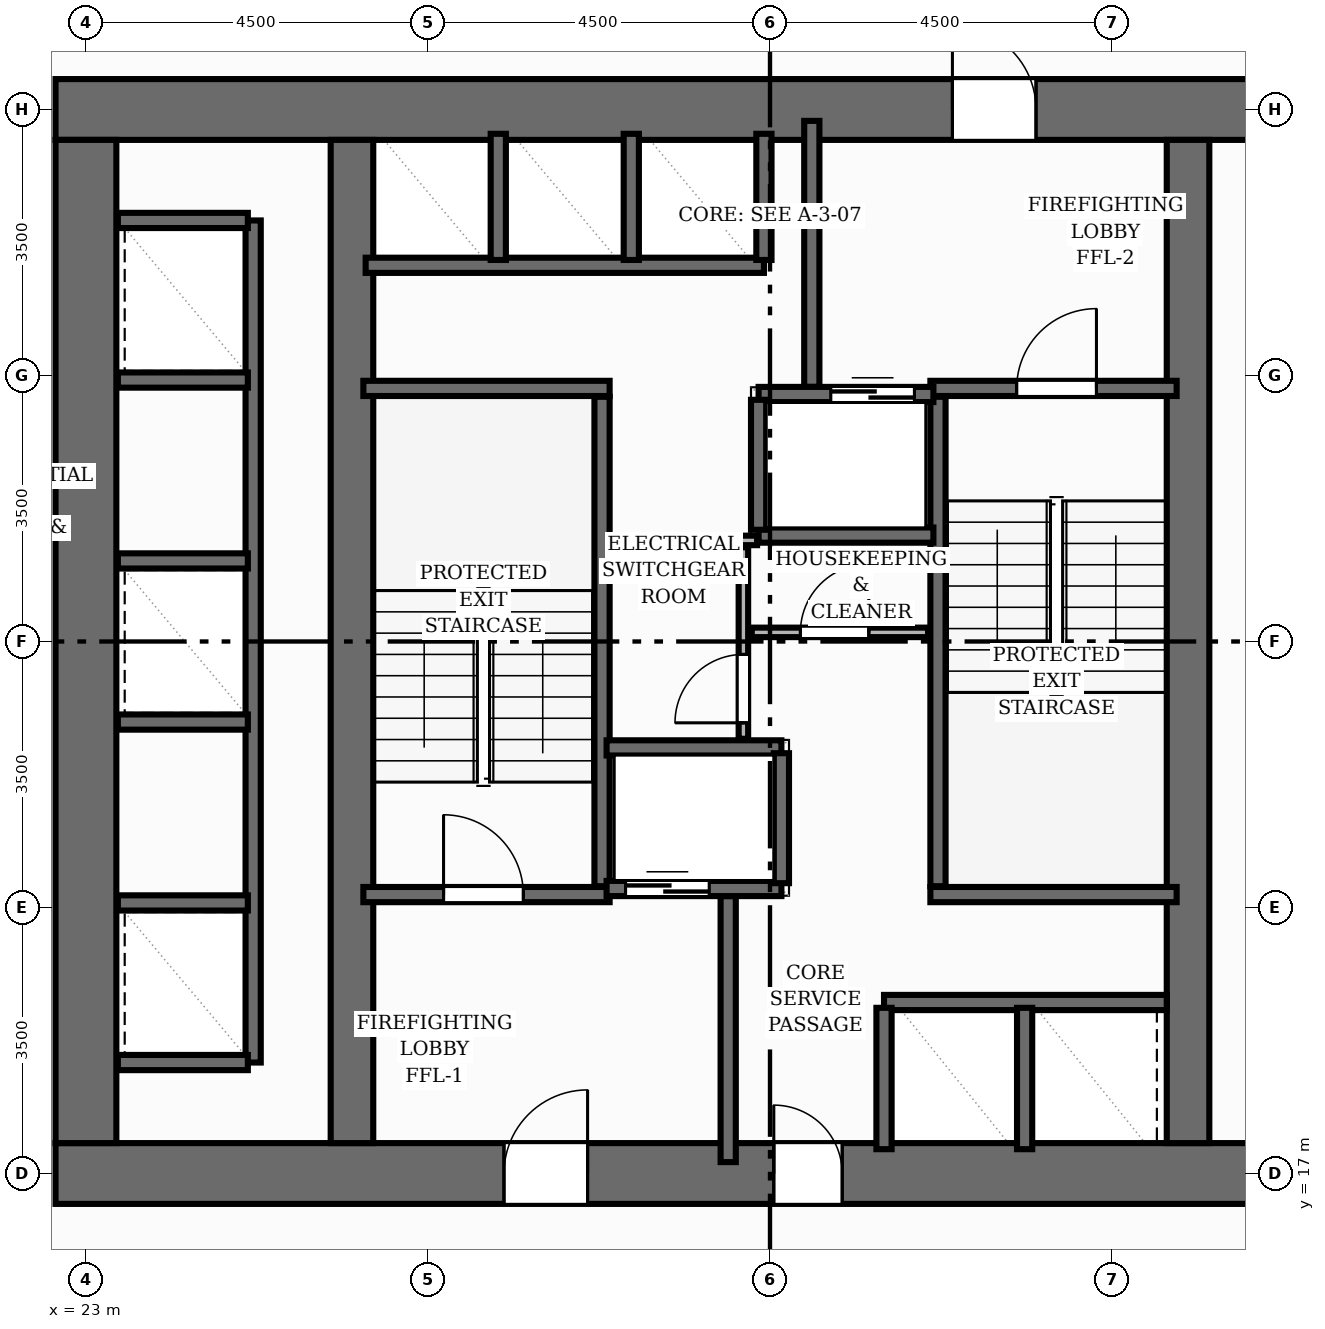
"""IFC4 building model, lengths in metres.
Left out: names, types, materials, properties, quantities, classifications, styles, units other than length and angle.
Written with IfcOpenShell. Run it as: python <this file> out.ifc"""

import sys

from ifc_helpers import new_model, si_unit, direction, frame, frame_2d, origin, place, context, subcontext, project, spatial, rectangle, extrude, element, fill, save


model = new_model("IFC4")
c1 = context("Model", 3, precision=1e-05, world=origin(), true_north=direction((0.0, 1.0)))
c2 = subcontext(c1, "Body", "Model", "MODEL_VIEW")
j1 = project(units=[si_unit("LENGTHUNIT", "METRE"), si_unit("PLANEANGLEUNIT", "RADIAN")], contexts=[c1])
p1 = place(None, origin())
s1 = spatial("IfcSite", under=j1, at=p1, CompositionType="ELEMENT")
p2 = place(p1, origin())
s2 = spatial("IfcBuilding", under=s1, at=p2, CompositionType="ELEMENT")
p3 = place(p2, frame((0.0, 0.0, 28.0)))
s3 = spatial("IfcBuildingStorey", under=s2, at=p3, CompositionType="ELEMENT", Elevation=28.0)
p4 = place(p3, frame((22.6, 17.0, 0.0), z_axis=(0.0, 0.0, 1.0), x_axis=(1.0, 0.0, 0.0)))
e1 = element("IfcWall", 1, at=p4, inside=s3, PredefinedType="SHEAR", context=c2, shape_type="SweptSolid", body=[
    extrude(rectangle(XDim=18.8, YDim=0.8, at=frame_2d((9.4, 0.0))), origin(), (0.0, 0.0, 1.0), 3.2),
])
p5 = place(p4, frame((5.9, 0.0, 0.0)))
e2 = element("IfcOpeningElement", 2, at=p5, cuts=e1, PredefinedType="OPENING", context=c2, shape_type="SweptSolid", body=[
    extrude(rectangle(XDim=1.1, YDim=2.15, at=frame_2d((0.55, 1.075))), frame((0.0, 0.41, 0.0), z_axis=(0.0, -1.0, 0.0), x_axis=(1.0, 0.0, 0.0)), (0.0, 0.0, 1.0), 0.82),
])
p6 = place(p4, frame((9.45, 0.0, 0.0)))
e3 = element("IfcOpeningElement", 3, at=p6, cuts=e1, PredefinedType="OPENING", context=c2, shape_type="SweptSolid", body=[
    extrude(rectangle(XDim=0.9, YDim=2.1, at=frame_2d((0.45, 1.05))), frame((0.0, 0.41, 0.0), z_axis=(0.0, -1.0, 0.0), x_axis=(1.0, 0.0, 0.0)), (0.0, 0.0, 1.0), 0.82),
])
p7 = place(p3, frame((22.6, 31.0, 0.0), z_axis=(0.0, 0.0, 1.0), x_axis=(1.0, 0.0, 0.0)))
e4 = element("IfcWall", 4, at=p7, inside=s3, PredefinedType="SHEAR", context=c2, shape_type="SweptSolid", body=[
    extrude(rectangle(XDim=18.8, YDim=0.8, at=frame_2d((9.4, 0.0))), origin(), (0.0, 0.0, 1.0), 3.2),
])
p8 = place(p7, frame((11.8, 0.0, 0.0)))
e5 = element("IfcOpeningElement", 5, at=p8, cuts=e4, PredefinedType="OPENING", context=c2, shape_type="SweptSolid", body=[
    extrude(rectangle(XDim=1.1, YDim=2.15, at=frame_2d((0.55, 1.075))), frame((0.0, 0.41, 0.0), z_axis=(0.0, -1.0, 0.0), x_axis=(1.0, 0.0, 0.0)), (0.0, 0.0, 1.0), 0.82),
])
p9 = place(p3, frame((23.0, 17.4, 0.0), z_axis=(0.0, 0.0, 1.0), x_axis=(0.0, 1.0, 0.0)))
e6 = element("IfcWall", 6, at=p9, inside=s3, PredefinedType="SHEAR", context=c2, shape_type="SweptSolid", body=[
    extrude(rectangle(XDim=13.2, YDim=0.8, at=frame_2d((6.6, 0.0))), origin(), (0.0, 0.0, 1.0), 3.2),
])
for number, where, z_axis, x_axis in (
    (7, (26.5, 17.4, 0.0), (0.0, 0.0, 1.0), (0.0, 1.0, 0.0)),
    (8, (37.5, 17.4, 0.0), (0.0, 0.0, 1.0), (0.0, 1.0, 0.0)),
):
    element("IfcWall", number, at=place(p3, frame(where, z_axis=z_axis, x_axis=x_axis)), inside=s3, PredefinedType="SHEAR", context=c2, shape_type="SweptSolid", body=[
        extrude(rectangle(XDim=13.2, YDim=0.56, at=frame_2d((6.6, 0.0))), origin(), (0.0, 0.0, 1.0), 3.2),
    ])
p10 = place(p3, frame((29.79, 20.78, 0.0), z_axis=(0.0, 0.0, 1.0), x_axis=(0.0, 1.0, 0.0)))
e9 = element("IfcWall", 9, at=p10, inside=s3, PredefinedType="SHEAR", context=c2, shape_type="SweptSolid", body=[
    extrude(rectangle(XDim=6.44, YDim=0.2, at=frame_2d((3.22, 0.0))), origin(), (0.0, 0.0, 1.0), 3.2),
])
p11 = place(p3, frame((26.65, 27.33, 0.0), z_axis=(0.0, 0.0, 1.0), x_axis=(1.0, 0.0, 0.0)))
e10 = element("IfcWall", 10, at=p11, inside=s3, PredefinedType="SHEAR", context=c2, shape_type="SweptSolid", body=[
    extrude(rectangle(XDim=3.24, YDim=0.2, at=frame_2d((1.62, 0.0))), origin(), (0.0, 0.0, 1.0), 3.2),
])
p12 = place(p3, frame((26.65, 20.67, 0.0), z_axis=(0.0, 0.0, 1.0), x_axis=(1.0, 0.0, 0.0)))
e11 = element("IfcWall", 11, at=p12, inside=s3, PredefinedType="SHEAR", context=c2, shape_type="SweptSolid", body=[
    extrude(rectangle(XDim=3.24, YDim=0.2, at=frame_2d((1.62, 0.0))), origin(), (0.0, 0.0, 1.0), 3.2),
])
p13 = place(p12, frame((1.055, 0.0, 0.0)))
e12 = element("IfcOpeningElement", 12, at=p13, cuts=e11, PredefinedType="OPENING", context=c2, shape_type="SweptSolid", body=[
    extrude(rectangle(XDim=1.05, YDim=2.15, at=frame_2d((0.525, 1.075))), frame((0.0, 0.11, 0.0), z_axis=(0.0, -1.0, 0.0), x_axis=(1.0, 0.0, 0.0)), (0.0, 0.0, 1.0), 0.22),
])
p14 = place(p3, frame((34.21, 20.78, 0.0), z_axis=(0.0, 0.0, 1.0), x_axis=(0.0, 1.0, 0.0)))
e13 = element("IfcWall", 13, at=p14, inside=s3, PredefinedType="SHEAR", context=c2, shape_type="SweptSolid", body=[
    extrude(rectangle(XDim=6.44, YDim=0.2, at=frame_2d((3.22, 0.0))), origin(), (0.0, 0.0, 1.0), 3.2),
])
p15 = place(p3, frame((34.11, 20.67, 0.0), z_axis=(0.0, 0.0, 1.0), x_axis=(1.0, 0.0, 0.0)))
e14 = element("IfcWall", 14, at=p15, inside=s3, PredefinedType="SHEAR", context=c2, shape_type="SweptSolid", body=[
    extrude(rectangle(XDim=3.24, YDim=0.2, at=frame_2d((1.62, 0.0))), origin(), (0.0, 0.0, 1.0), 3.2),
])
p16 = place(p3, frame((34.11, 27.33, 0.0), z_axis=(0.0, 0.0, 1.0), x_axis=(1.0, 0.0, 0.0)))
e15 = element("IfcWall", 15, at=p16, inside=s3, PredefinedType="SHEAR", context=c2, shape_type="SweptSolid", body=[
    extrude(rectangle(XDim=3.24, YDim=0.2, at=frame_2d((1.62, 0.0))), origin(), (0.0, 0.0, 1.0), 3.2),
])
p17 = place(p16, frame((1.135, 0.0, 0.0)))
e16 = element("IfcOpeningElement", 16, at=p17, cuts=e15, PredefinedType="OPENING", context=c2, shape_type="SweptSolid", body=[
    extrude(rectangle(XDim=1.05, YDim=2.15, at=frame_2d((0.525, 1.075))), frame((0.0, 0.11, 0.0), z_axis=(0.0, -1.0, 0.0), x_axis=(1.0, 0.0, 0.0)), (0.0, 0.0, 1.0), 0.22),
])
for number, where, z_axis, x_axis in (
    (17, (31.45, 17.15, 0.0), (0.0, 0.0, 1.0), (0.0, 1.0, 0.0)),
    (18, (32.55, 27.35, 0.0), (0.0, 0.0, 1.0), (0.0, 1.0, 0.0)),
):
    element("IfcWall", number, at=place(p3, frame(where, z_axis=z_axis, x_axis=x_axis)), inside=s3, PredefinedType="SHEAR", context=c2, shape_type="SweptSolid", body=[
        extrude(rectangle(XDim=3.5, YDim=0.2, at=frame_2d((1.75, 0.0))), origin(), (0.0, 0.0, 1.0), 3.2),
    ])
p18 = place(p3, frame((29.85, 20.75, 0.0), z_axis=(0.0, 0.0, 1.0), x_axis=(1.0, 0.0, 0.0)))
e19 = element("IfcWall", 19, at=p18, inside=s3, PredefinedType="SHEAR", context=c2, shape_type="SweptSolid", body=[
    extrude(rectangle(XDim=2.3, YDim=0.2, at=frame_2d((1.15, 0.0))), origin(), (0.0, 0.0, 1.0), 3.2),
])
p19 = place(p18, frame((0.25, 0.0, 0.0)))
e20 = element("IfcOpeningElement", 20, at=p19, cuts=e19, PredefinedType="OPENING", context=c2, shape_type="SweptSolid", body=[
    extrude(rectangle(XDim=1.1, YDim=2.15, at=frame_2d((0.55, 1.075))), frame((0.0, 0.11, 0.0), z_axis=(0.0, -1.0, 0.0), x_axis=(1.0, 0.0, 0.0)), (0.0, 0.0, 1.0), 0.22),
])
p20 = place(p3, frame((29.85, 22.6, 0.0), z_axis=(0.0, 0.0, 1.0), x_axis=(1.0, 0.0, 0.0)))
e21 = element("IfcWall", 21, at=p20, inside=s3, PredefinedType="SHEAR", context=c2, shape_type="SweptSolid", body=[
    extrude(rectangle(XDim=2.3, YDim=0.2, at=frame_2d((1.15, 0.0))), origin(), (0.0, 0.0, 1.0), 3.2),
])
p21 = place(p3, frame((32.15, 20.82, 0.0), z_axis=(0.0, 0.0, 1.0), x_axis=(0.0, 1.0, 0.0)))
e22 = element("IfcWall", 22, at=p21, inside=s3, PredefinedType="SHEAR", context=c2, shape_type="SweptSolid", body=[
    extrude(rectangle(XDim=1.71, YDim=0.2, at=frame_2d((0.855, 0.0))), origin(), (0.0, 0.0, 1.0), 3.2),
])
p22 = place(p3, frame((31.85, 27.25, 0.0), z_axis=(0.0, 0.0, 1.0), x_axis=(1.0, 0.0, 0.0)))
e23 = element("IfcWall", 23, at=p22, inside=s3, PredefinedType="SHEAR", context=c2, shape_type="SweptSolid", body=[
    extrude(rectangle(XDim=2.3, YDim=0.2, at=frame_2d((1.15, 0.0))), origin(), (0.0, 0.0, 1.0), 3.2),
])
p23 = place(p22, frame((0.95, 0.0, 0.0)))
e24 = element("IfcOpeningElement", 24, at=p23, cuts=e23, PredefinedType="OPENING", context=c2, shape_type="SweptSolid", body=[
    extrude(rectangle(XDim=1.1, YDim=2.15, at=frame_2d((0.55, 1.075))), frame((0.0, 0.11, 0.0), z_axis=(0.0, -1.0, 0.0), x_axis=(1.0, 0.0, 0.0)), (0.0, 0.0, 1.0), 0.22),
])
p24 = place(p3, frame((31.85, 25.4, 0.0), z_axis=(0.0, 0.0, 1.0), x_axis=(1.0, 0.0, 0.0)))
e25 = element("IfcWall", 25, at=p24, inside=s3, PredefinedType="SHEAR", context=c2, shape_type="SweptSolid", body=[
    extrude(rectangle(XDim=2.3, YDim=0.2, at=frame_2d((1.15, 0.0))), origin(), (0.0, 0.0, 1.0), 3.2),
])
p25 = place(p3, frame((31.85, 25.47, 0.0), z_axis=(0.0, 0.0, 1.0), x_axis=(0.0, 1.0, 0.0)))
e26 = element("IfcWall", 26, at=p25, inside=s3, PredefinedType="SHEAR", context=c2, shape_type="SweptSolid", body=[
    extrude(rectangle(XDim=1.71, YDim=0.2, at=frame_2d((0.855, 0.0))), origin(), (0.0, 0.0, 1.0), 3.2),
])
p26 = place(p3, frame((25.2, 18.46, 0.0), z_axis=(0.0, 0.0, 1.0), x_axis=(0.0, 1.0, 0.0)))
e27 = element("IfcWall", 27, at=p26, inside=s3, PredefinedType="SHEAR", context=c2, shape_type="SweptSolid", body=[
    extrude(rectangle(XDim=11.08, YDim=0.2, at=frame_2d((5.54, 0.0))), origin(), (0.0, 0.0, 1.0), 3.2),
])
for number, where, z_axis, x_axis in (
    (28, (23.42, 18.46, 0.0), (0.0, 0.0, 1.0), (1.0, 0.0, 0.0)),
    (29, (23.42, 29.54, 0.0), (0.0, 0.0, 1.0), (1.0, 0.0, 0.0)),
    (30, (23.42, 20.56, 0.0), (0.0, 0.0, 1.0), (1.0, 0.0, 0.0)),
    (31, (23.42, 22.94, 0.0), (0.0, 0.0, 1.0), (1.0, 0.0, 0.0)),
    (32, (23.42, 25.06, 0.0), (0.0, 0.0, 1.0), (1.0, 0.0, 0.0)),
    (33, (23.42, 27.44, 0.0), (0.0, 0.0, 1.0), (1.0, 0.0, 0.0)),
):
    element("IfcWall", number, at=place(p3, frame(where, z_axis=z_axis, x_axis=x_axis)), inside=s3, PredefinedType="SHEAR", context=c2, shape_type="SweptSolid", body=[
        extrude(rectangle(XDim=1.71, YDim=0.2, at=frame_2d((0.855, 0.0))), origin(), (0.0, 0.0, 1.0), 3.2),
    ])
p27 = place(p3, frame((26.68, 28.95, 0.0), z_axis=(0.0, 0.0, 1.0), x_axis=(1.0, 0.0, 0.0)))
e34 = element("IfcWall", 34, at=p27, inside=s3, PredefinedType="SHEAR", context=c2, shape_type="SweptSolid", body=[
    extrude(rectangle(XDim=5.24, YDim=0.2, at=frame_2d((2.62, 0.0))), origin(), (0.0, 0.0, 1.0), 3.2),
])
for number, where, z_axis, x_axis in (
    (35, (31.92, 29.02, 0.0), (0.0, 0.0, 1.0), (0.0, 1.0, 0.0)),
    (36, (28.425, 29.02, 0.0), (0.0, 0.0, 1.0), (0.0, 1.0, 0.0)),
    (37, (30.175, 29.02, 0.0), (0.0, 0.0, 1.0), (0.0, 1.0, 0.0)),
):
    element("IfcWall", number, at=place(p3, frame(where, z_axis=z_axis, x_axis=x_axis)), inside=s3, PredefinedType="SHEAR", context=c2, shape_type="SweptSolid", body=[
        extrude(rectangle(XDim=1.66, YDim=0.2, at=frame_2d((0.83, 0.0))), origin(), (0.0, 0.0, 1.0), 3.2),
    ])
p28 = place(p3, frame((33.5, 19.25, 0.0), z_axis=(0.0, 0.0, 1.0), x_axis=(1.0, 0.0, 0.0)))
e38 = element("IfcWall", 38, at=p28, inside=s3, PredefinedType="SHEAR", context=c2, shape_type="SweptSolid", body=[
    extrude(rectangle(XDim=3.72, YDim=0.2, at=frame_2d((1.86, 0.0))), origin(), (0.0, 0.0, 1.0), 3.2),
])
for number, where, z_axis, x_axis in (
    (39, (33.5, 17.32, 0.0), (0.0, 0.0, 1.0), (0.0, 1.0, 0.0)),
    (40, (35.35, 17.32, 0.0), (0.0, 0.0, 1.0), (0.0, 1.0, 0.0)),
):
    element("IfcWall", number, at=place(p3, frame(where, z_axis=z_axis, x_axis=x_axis)), inside=s3, PredefinedType="SHEAR", context=c2, shape_type="SweptSolid", body=[
        extrude(rectangle(XDim=1.86, YDim=0.2, at=frame_2d((0.93, 0.0))), origin(), (0.0, 0.0, 1.0), 3.2),
    ])
p29 = place(p3, frame((31.65, 22.72, 0.0), z_axis=(0.0, 0.0, 1.0), x_axis=(0.0, 1.0, 0.0)))
e41 = element("IfcWall", 41, at=p29, inside=s3, PredefinedType="PARTITIONING", context=c2, shape_type="SweptSolid", body=[
    extrude(rectangle(XDim=2.52, YDim=0.125, at=frame_2d((1.26, 0.0))), origin(), (0.0, 0.0, 1.0), 2.955),
])
p30 = place(p29, frame((0.21, 0.0, 0.0)))
e42 = element("IfcOpeningElement", 42, at=p30, cuts=e41, PredefinedType="OPENING", context=c2, shape_type="SweptSolid", body=[
    extrude(rectangle(XDim=0.9, YDim=2.1, at=frame_2d((0.45, 1.05))), frame((0.0, 0.073, 0.0), z_axis=(0.0, -1.0, 0.0), x_axis=(1.0, 0.0, 0.0)), (0.0, 0.0, 1.0), 0.145),
])
p31 = place(p3, frame((31.76, 24.12, 0.0), z_axis=(0.0, 0.0, 1.0), x_axis=(1.0, 0.0, 0.0)))
e43 = element("IfcWall", 43, at=p31, inside=s3, PredefinedType="PARTITIONING", context=c2, shape_type="SweptSolid", body=[
    extrude(rectangle(XDim=2.32, YDim=0.125, at=frame_2d((1.16, 0.0))), origin(), (0.0, 0.0, 1.0), 2.955),
])
p32 = place(p31, frame((0.64, 0.0, 0.0)))
e44 = element("IfcOpeningElement", 44, at=p32, cuts=e43, PredefinedType="OPENING", context=c2, shape_type="SweptSolid", body=[
    extrude(rectangle(XDim=0.9, YDim=2.1, at=frame_2d((0.45, 1.05))), frame((0.0, 0.073, 0.0), z_axis=(0.0, -1.0, 0.0), x_axis=(1.0, 0.0, 0.0)), (0.0, 0.0, 1.0), 0.145),
])
p33 = place(p3, frame((29.89, 25.33, 0.0), z_axis=(0.0, 0.0, 1.0), x_axis=(1.0, 0.0, 0.0)))
e45 = element("IfcWall", 45, at=p33, inside=s3, PredefinedType="PARTITIONING", context=c2, shape_type="SweptSolid", body=[
    extrude(rectangle(XDim=1.94, YDim=0.125, at=frame_2d((0.97, 0.0))), origin(), (0.0, 0.0, 1.0), 2.955),
])
p34 = place(p13, origin())
e46 = element("IfcDoor", 46, at=p34, inside=s3, OperationType="SINGLE_SWING_LEFT", PredefinedType="DOOR", context=c2, shape_type="SweptSolid", body=[
    extrude(rectangle(XDim=1.05, YDim=2.15, at=frame_2d((0.525, 1.075))), frame((0.0, 0.025, 0.0), z_axis=(0.0, -1.0, 0.0), x_axis=(1.0, 0.0, 0.0)), (0.0, 0.0, 1.0), 0.05),
])
fill(e12, e46)
p35 = place(p17, origin())
e47 = element("IfcDoor", 47, at=p35, inside=s3, OperationType="SINGLE_SWING_RIGHT", PredefinedType="DOOR", context=c2, shape_type="SweptSolid", body=[
    extrude(rectangle(XDim=1.05, YDim=2.15, at=frame_2d((0.525, 1.075))), frame((0.0, 0.025, 0.0), z_axis=(0.0, -1.0, 0.0), x_axis=(1.0, 0.0, 0.0)), (0.0, 0.0, 1.0), 0.05),
])
fill(e16, e47)
p36 = place(p5, origin())
e48 = element("IfcDoor", 48, at=p36, inside=s3, OperationType="SINGLE_SWING_RIGHT", PredefinedType="DOOR", context=c2, shape_type="SweptSolid", body=[
    extrude(rectangle(XDim=1.1, YDim=2.15, at=frame_2d((0.55, 1.075))), frame((0.0, 0.025, 0.0), z_axis=(0.0, -1.0, 0.0), x_axis=(1.0, 0.0, 0.0)), (0.0, 0.0, 1.0), 0.05),
])
fill(e2, e48)
p37 = place(p8, origin())
e49 = element("IfcDoor", 49, at=p37, inside=s3, OperationType="SINGLE_SWING_LEFT", PredefinedType="DOOR", context=c2, shape_type="SweptSolid", body=[
    extrude(rectangle(XDim=1.1, YDim=2.15, at=frame_2d((0.55, 1.075))), frame((0.0, 0.025, 0.0), z_axis=(0.0, -1.0, 0.0), x_axis=(1.0, 0.0, 0.0)), (0.0, 0.0, 1.0), 0.05),
])
fill(e5, e49)
p38 = place(p19, origin())
e50 = element("IfcDoor", 50, at=p38, inside=s3, OperationType="DOUBLE_DOOR_SLIDING", PredefinedType="DOOR", context=c2, shape_type="SweptSolid", body=[
    extrude(rectangle(XDim=1.1, YDim=2.15, at=frame_2d((0.55, 1.075))), frame((0.0, 0.025, 0.0), z_axis=(0.0, -1.0, 0.0), x_axis=(1.0, 0.0, 0.0)), (0.0, 0.0, 1.0), 0.05),
])
fill(e20, e50)
p39 = place(p23, origin())
e51 = element("IfcDoor", 51, at=p39, inside=s3, OperationType="DOUBLE_DOOR_SLIDING", PredefinedType="DOOR", context=c2, shape_type="SweptSolid", body=[
    extrude(rectangle(XDim=1.1, YDim=2.15, at=frame_2d((0.55, 1.075))), frame((0.0, 0.025, 0.0), z_axis=(0.0, -1.0, 0.0), x_axis=(1.0, 0.0, 0.0)), (0.0, 0.0, 1.0), 0.05),
])
fill(e24, e51)
p40 = place(p6, origin())
e52 = element("IfcDoor", 52, at=p40, inside=s3, OperationType="SINGLE_SWING_LEFT", PredefinedType="DOOR", context=c2, shape_type="SweptSolid", body=[
    extrude(rectangle(XDim=0.9, YDim=2.1, at=frame_2d((0.45, 1.05))), frame((0.0, 0.025, 0.0), z_axis=(0.0, -1.0, 0.0), x_axis=(1.0, 0.0, 0.0)), (0.0, 0.0, 1.0), 0.05),
])
fill(e3, e52)
p41 = place(p30, origin())
e53 = element("IfcDoor", 53, at=p41, inside=s3, OperationType="SINGLE_SWING_LEFT", PredefinedType="DOOR", context=c2, shape_type="SweptSolid", body=[
    extrude(rectangle(XDim=0.9, YDim=2.1, at=frame_2d((0.45, 1.05))), frame((0.0, 0.025, 0.0), z_axis=(0.0, -1.0, 0.0), x_axis=(1.0, 0.0, 0.0)), (0.0, 0.0, 1.0), 0.05),
])
fill(e42, e53)
p42 = place(p32, origin())
e54 = element("IfcDoor", 54, at=p42, inside=s3, OperationType="SINGLE_SWING_RIGHT", PredefinedType="DOOR", context=c2, shape_type="SweptSolid", body=[
    extrude(rectangle(XDim=0.9, YDim=2.1, at=frame_2d((0.45, 1.05))), frame((0.0, 0.025, 0.0), z_axis=(0.0, -1.0, 0.0), x_axis=(1.0, 0.0, 0.0)), (0.0, 0.0, 1.0), 0.05),
])
fill(e44, e54)
save(model, sys.argv[1])
